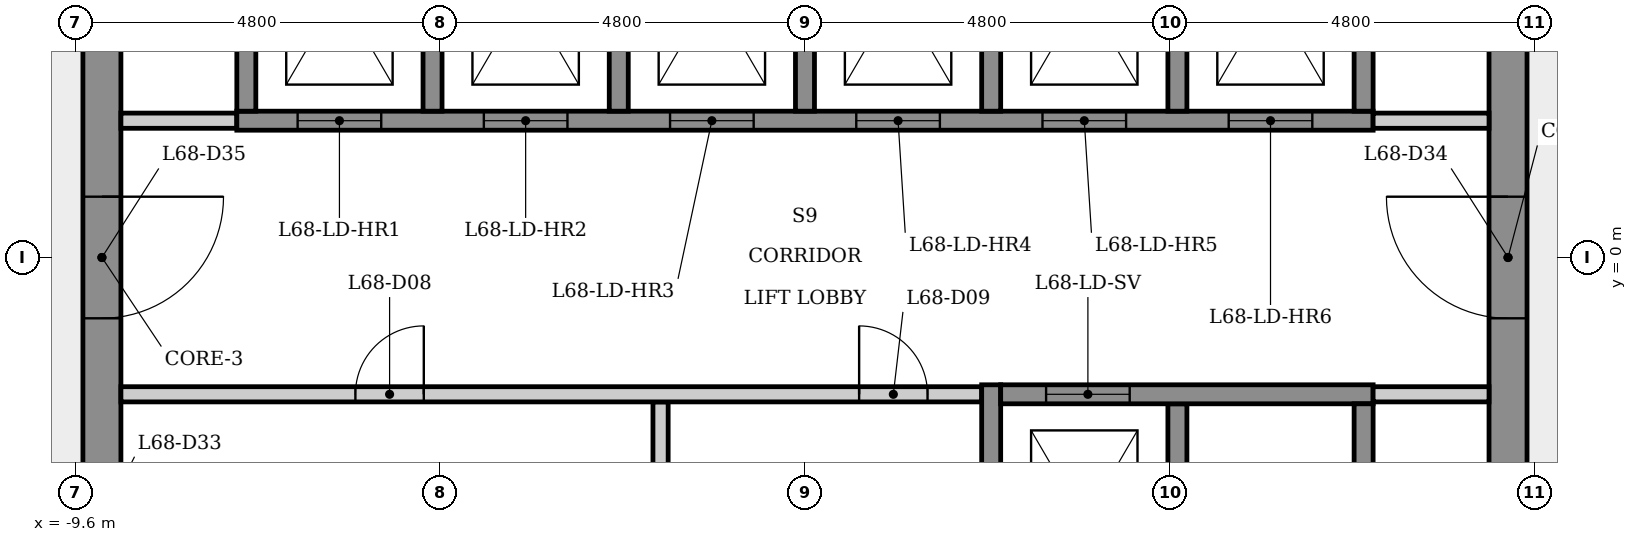
"""IFC4 building model, lengths in metres.
Left out: names, types, materials, properties, quantities, classifications, styles, units other than length and angle.
Written with IfcOpenShell. Run it as: python <this file> out.ifc"""

import sys

from ifc_helpers import new_model, si_unit, direction, frame, frame_2d, origin, place, context, subcontext, project, spatial, rectangle, extrude, element, fill, save


model = new_model("IFC4")
c1 = context("Model", 3, precision=1e-05, world=origin(), true_north=direction((0.0, 1.0)))
c2 = subcontext(c1, "Body", "Model", "MODEL_VIEW")
j1 = project(units=[si_unit("LENGTHUNIT", "METRE"), si_unit("PLANEANGLEUNIT", "RADIAN")], contexts=[c1])
p1 = place(None, origin())
s1 = spatial("IfcSite", under=j1, at=p1, CompositionType="ELEMENT")
p2 = place(p1, origin())
s2 = spatial("IfcBuilding", under=s1, at=p2, CompositionType="ELEMENT")
p3 = place(p2, frame((0.0, 0.0, 252.9)))
s3 = spatial("IfcBuildingStorey", under=s2, at=p3, CompositionType="ELEMENT", Elevation=252.9)
p4 = place(p3, frame((9.25, -5.485, 0.0), z_axis=(0.0, 0.0, 1.0), x_axis=(0.0, 1.0, 0.0)))
e1 = element("IfcWall", 1, at=p4, inside=s3, PredefinedType="SHEAR", context=c2, shape_type="SweptSolid", body=[
    extrude(rectangle(XDim=10.97, YDim=0.5, at=frame_2d((5.485, 0.0))), origin(), (0.0, 0.0, 1.0), 5.0),
])
p5 = place(p4, frame((4.685, 0.0, 0.0)))
e2 = element("IfcOpeningElement", 2, at=p5, cuts=e1, PredefinedType="OPENING", context=c2, shape_type="SweptSolid", body=[
    extrude(rectangle(XDim=1.6, YDim=2.1, at=frame_2d((0.8, 1.05))), frame((0.0, 0.26, 0.0), z_axis=(0.0, -1.0, 0.0), x_axis=(1.0, 0.0, 0.0)), (0.0, 0.0, 1.0), 0.52),
])
p6 = place(p3, frame((-9.25, 5.485, 0.0), z_axis=(0.0, 0.0, 1.0), x_axis=(0.0, -1.0, 0.0)))
e3 = element("IfcWall", 3, at=p6, inside=s3, PredefinedType="SHEAR", context=c2, shape_type="SweptSolid", body=[
    extrude(rectangle(XDim=10.97, YDim=0.5, at=frame_2d((5.485, 0.0))), origin(), (0.0, 0.0, 1.0), 5.0),
])
p7 = place(p6, frame((8.51, 0.0, 0.0)))
e4 = element("IfcOpeningElement", 4, at=p7, cuts=e3, PredefinedType="OPENING", context=c2, shape_type="SweptSolid", body=[
    extrude(rectangle(XDim=0.9, YDim=2.1, at=frame_2d((0.45, 1.05))), frame((0.0, 0.26, 0.0), z_axis=(0.0, -1.0, 0.0), x_axis=(1.0, 0.0, 0.0)), (0.0, 0.0, 1.0), 0.52),
])
p8 = place(p6, frame((4.685, 0.0, 0.0)))
e5 = element("IfcOpeningElement", 5, at=p8, cuts=e3, PredefinedType="OPENING", context=c2, shape_type="SweptSolid", body=[
    extrude(rectangle(XDim=1.6, YDim=2.1, at=frame_2d((0.8, 1.05))), frame((0.0, 0.26, 0.0), z_axis=(0.0, -1.0, 0.0), x_axis=(1.0, 0.0, 0.0)), (0.0, 0.0, 1.0), 0.52),
])
p9 = place(p3, frame((-9.0, 1.8, 0.0), z_axis=(0.0, 0.0, 1.0), x_axis=(1.0, 0.0, 0.0)))
e6 = element("IfcWall", 6, at=p9, inside=s3, PredefinedType="PARTITIONING", context=c2, shape_type="SweptSolid", body=[
    extrude(rectangle(XDim=1.525, YDim=0.2, at=frame_2d((0.763, 0.0))), origin(), (0.0, 0.0, 1.0), 4.6),
])
p10 = place(p3, frame((-7.475, 1.8, 0.0), z_axis=(0.0, 0.0, 1.0), x_axis=(1.0, 0.0, 0.0)))
e7 = element("IfcWall", 7, at=p10, inside=s3, PredefinedType="SHEAR", context=c2, shape_type="SweptSolid", body=[
    extrude(rectangle(XDim=14.95, YDim=0.25, at=frame_2d((7.475, 0.0))), origin(), (0.0, 0.0, 1.0), 4.6),
])
p11 = place(p10, frame((0.8, 0.0, 0.0)))
e8 = element("IfcOpeningElement", 8, at=p11, cuts=e7, PredefinedType="OPENING", context=c2, shape_type="SweptSolid", body=[
    extrude(rectangle(XDim=1.1, YDim=2.1, at=frame_2d((0.55, 1.05))), frame((0.0, 0.135, 0.0), z_axis=(0.0, -1.0, 0.0), x_axis=(1.0, 0.0, 0.0)), (0.0, 0.0, 1.0), 0.27),
])
p12 = place(p10, frame((3.25, 0.0, 0.0)))
e9 = element("IfcOpeningElement", 9, at=p12, cuts=e7, PredefinedType="OPENING", context=c2, shape_type="SweptSolid", body=[
    extrude(rectangle(XDim=1.1, YDim=2.1, at=frame_2d((0.55, 1.05))), frame((0.0, 0.135, 0.0), z_axis=(0.0, -1.0, 0.0), x_axis=(1.0, 0.0, 0.0)), (0.0, 0.0, 1.0), 0.27),
])
p13 = place(p10, frame((5.7, 0.0, 0.0)))
e10 = element("IfcOpeningElement", 10, at=p13, cuts=e7, PredefinedType="OPENING", context=c2, shape_type="SweptSolid", body=[
    extrude(rectangle(XDim=1.1, YDim=2.1, at=frame_2d((0.55, 1.05))), frame((0.0, 0.135, 0.0), z_axis=(0.0, -1.0, 0.0), x_axis=(1.0, 0.0, 0.0)), (0.0, 0.0, 1.0), 0.27),
])
p14 = place(p10, frame((8.15, 0.0, 0.0)))
e11 = element("IfcOpeningElement", 11, at=p14, cuts=e7, PredefinedType="OPENING", context=c2, shape_type="SweptSolid", body=[
    extrude(rectangle(XDim=1.1, YDim=2.1, at=frame_2d((0.55, 1.05))), frame((0.0, 0.135, 0.0), z_axis=(0.0, -1.0, 0.0), x_axis=(1.0, 0.0, 0.0)), (0.0, 0.0, 1.0), 0.27),
])
p15 = place(p10, frame((10.6, 0.0, 0.0)))
e12 = element("IfcOpeningElement", 12, at=p15, cuts=e7, PredefinedType="OPENING", context=c2, shape_type="SweptSolid", body=[
    extrude(rectangle(XDim=1.1, YDim=2.1, at=frame_2d((0.55, 1.05))), frame((0.0, 0.135, 0.0), z_axis=(0.0, -1.0, 0.0), x_axis=(1.0, 0.0, 0.0)), (0.0, 0.0, 1.0), 0.27),
])
p16 = place(p10, frame((13.05, 0.0, 0.0)))
e13 = element("IfcOpeningElement", 13, at=p16, cuts=e7, PredefinedType="OPENING", context=c2, shape_type="SweptSolid", body=[
    extrude(rectangle(XDim=1.1, YDim=2.1, at=frame_2d((0.55, 1.05))), frame((0.0, 0.135, 0.0), z_axis=(0.0, -1.0, 0.0), x_axis=(1.0, 0.0, 0.0)), (0.0, 0.0, 1.0), 0.27),
])
p17 = place(p3, frame((-7.35, 1.925, 0.0), z_axis=(0.0, 0.0, 1.0), x_axis=(0.0, 1.0, 0.0)))
e14 = element("IfcWall", 14, at=p17, inside=s3, PredefinedType="SHEAR", context=c2, shape_type="SweptSolid", body=[
    extrude(rectangle(XDim=3.35, YDim=0.25, at=frame_2d((1.675, 0.0))), origin(), (0.0, 0.0, 1.0), 4.6),
])
for number, where, z_axis, x_axis in (
    (15, (-4.9, 5.025, 0.0), (0.0, 0.0, 1.0), (0.0, -1.0, 0.0)),
    (16, (-2.45, 5.025, 0.0), (0.0, 0.0, 1.0), (0.0, -1.0, 0.0)),
):
    element("IfcWall", number, at=place(p3, frame(where, z_axis=z_axis, x_axis=x_axis)), inside=s3, PredefinedType="SHEAR", context=c2, shape_type="SweptSolid", body=[
        extrude(rectangle(XDim=3.1, YDim=0.25, at=frame_2d((1.55, 0.0))), origin(), (0.0, 0.0, 1.0), 5.0),
    ])
p18 = place(p3, frame((-1.9, -1.9, 0.0), z_axis=(0.0, 0.0, 1.0), x_axis=(0.0, -1.0, 0.0)))
e17 = element("IfcWall", 17, at=p18, inside=s3, PredefinedType="PARTITIONING", context=c2, shape_type="SweptSolid", body=[
    extrude(rectangle(XDim=3.15, YDim=0.2, at=frame_2d((1.575, 0.0))), origin(), (0.0, 0.0, 1.0), 4.6),
])
p19 = place(p3, frame((-9.0, -1.8, 0.0), z_axis=(0.0, 0.0, 1.0), x_axis=(1.0, 0.0, 0.0)))
e18 = element("IfcWall", 18, at=p19, inside=s3, PredefinedType="PARTITIONING", context=c2, shape_type="SweptSolid", body=[
    extrude(rectangle(XDim=11.325, YDim=0.2, at=frame_2d((5.663, 0.0))), origin(), (0.0, 0.0, 1.0), 4.6),
])
p20 = place(p19, frame((3.085, 0.0, 0.0)))
e19 = element("IfcOpeningElement", 19, at=p20, cuts=e18, PredefinedType="OPENING", context=c2, shape_type="SweptSolid", body=[
    extrude(rectangle(XDim=0.9, YDim=2.1, at=frame_2d((0.45, 1.05))), frame((0.0, 0.11, 0.0), z_axis=(0.0, -1.0, 0.0), x_axis=(1.0, 0.0, 0.0)), (0.0, 0.0, 1.0), 0.22),
])
p21 = place(p19, frame((9.713, 0.0, 0.0)))
e20 = element("IfcOpeningElement", 20, at=p21, cuts=e18, PredefinedType="OPENING", context=c2, shape_type="SweptSolid", body=[
    extrude(rectangle(XDim=0.9, YDim=2.1, at=frame_2d((0.45, 1.05))), frame((0.0, 0.11, 0.0), z_axis=(0.0, -1.0, 0.0), x_axis=(1.0, 0.0, 0.0)), (0.0, 0.0, 1.0), 0.22),
])
p22 = place(p3, frame((0.0, 5.025, 0.0), z_axis=(0.0, 0.0, 1.0), x_axis=(0.0, -1.0, 0.0)))
e21 = element("IfcWall", 21, at=p22, inside=s3, PredefinedType="SHEAR", context=c2, shape_type="SweptSolid", body=[
    extrude(rectangle(XDim=3.1, YDim=0.25, at=frame_2d((1.55, 0.0))), origin(), (0.0, 0.0, 1.0), 5.0),
])
p23 = place(p3, frame((2.45, -5.275, 0.0), z_axis=(0.0, 0.0, 1.0), x_axis=(0.0, 1.0, 0.0)))
e22 = element("IfcWall", 22, at=p23, inside=s3, PredefinedType="SHEAR", context=c2, shape_type="SweptSolid", body=[
    extrude(rectangle(XDim=3.6, YDim=0.25, at=frame_2d((1.8, 0.0))), origin(), (0.0, 0.0, 1.0), 4.6),
])
for number, where, z_axis, x_axis in (
    (23, (2.45, 5.025, 0.0), (0.0, 0.0, 1.0), (0.0, -1.0, 0.0)),
    (24, (4.9, -1.925, 0.0), (0.0, 0.0, 1.0), (0.0, -1.0, 0.0)),
    (25, (4.9, 5.025, 0.0), (0.0, 0.0, 1.0), (0.0, -1.0, 0.0)),
):
    element("IfcWall", number, at=place(p3, frame(where, z_axis=z_axis, x_axis=x_axis)), inside=s3, PredefinedType="SHEAR", context=c2, shape_type="SweptSolid", body=[
        extrude(rectangle(XDim=3.1, YDim=0.25, at=frame_2d((1.55, 0.0))), origin(), (0.0, 0.0, 1.0), 5.0),
    ])
p24 = place(p3, frame((2.575, -1.8, 0.0), z_axis=(0.0, 0.0, 1.0), x_axis=(1.0, 0.0, 0.0)))
e26 = element("IfcWall", 26, at=p24, inside=s3, PredefinedType="SHEAR", context=c2, shape_type="SweptSolid", body=[
    extrude(rectangle(XDim=4.9, YDim=0.25, at=frame_2d((2.45, 0.0))), origin(), (0.0, 0.0, 1.0), 4.6),
])
p25 = place(p24, frame((0.597, 0.0, 0.0)))
e27 = element("IfcOpeningElement", 27, at=p25, cuts=e26, PredefinedType="OPENING", context=c2, shape_type="SweptSolid", body=[
    extrude(rectangle(XDim=1.1, YDim=2.1, at=frame_2d((0.55, 1.05))), frame((0.0, 0.135, 0.0), z_axis=(0.0, -1.0, 0.0), x_axis=(1.0, 0.0, 0.0)), (0.0, 0.0, 1.0), 0.27),
])
p26 = place(p3, frame((7.475, 1.8, 0.0), z_axis=(0.0, 0.0, 1.0), x_axis=(1.0, 0.0, 0.0)))
e28 = element("IfcWall", 28, at=p26, inside=s3, PredefinedType="PARTITIONING", context=c2, shape_type="SweptSolid", body=[
    extrude(rectangle(XDim=1.525, YDim=0.2, at=frame_2d((0.763, 0.0))), origin(), (0.0, 0.0, 1.0), 4.6),
])
for number, where, z_axis, x_axis in (
    (29, (7.35, -1.925, 0.0), (0.0, 0.0, 1.0), (0.0, -1.0, 0.0)),
    (30, (7.35, 5.025, 0.0), (0.0, 0.0, 1.0), (0.0, -1.0, 0.0)),
):
    element("IfcWall", number, at=place(p3, frame(where, z_axis=z_axis, x_axis=x_axis)), inside=s3, PredefinedType="SHEAR", context=c2, shape_type="SweptSolid", body=[
        extrude(rectangle(XDim=3.1, YDim=0.25, at=frame_2d((1.55, 0.0))), origin(), (0.0, 0.0, 1.0), 5.0),
    ])
p27 = place(p3, frame((9.0, -1.8, 0.0), z_axis=(0.0, 0.0, 1.0), x_axis=(-1.0, 0.0, 0.0)))
e31 = element("IfcWall", 31, at=p27, inside=s3, PredefinedType="PARTITIONING", context=c2, shape_type="SweptSolid", body=[
    extrude(rectangle(XDim=1.525, YDim=0.2, at=frame_2d((0.763, 0.0))), origin(), (0.0, 0.0, 1.0), 4.6),
])
p28 = place(p11, origin())
e32 = element("IfcDoor", 32, at=p28, inside=s3, OperationType="SLIDING_TO_LEFT", PredefinedType="DOOR", context=c2, shape_type="SweptSolid", body=[
    extrude(rectangle(XDim=1.1, YDim=2.1, at=frame_2d((0.55, 1.05))), frame((0.0, 0.025, 0.0), z_axis=(0.0, -1.0, 0.0), x_axis=(1.0, 0.0, 0.0)), (0.0, 0.0, 1.0), 0.05),
])
fill(e8, e32)
p29 = place(p12, origin())
e33 = element("IfcDoor", 33, at=p29, inside=s3, OperationType="SLIDING_TO_LEFT", PredefinedType="DOOR", context=c2, shape_type="SweptSolid", body=[
    extrude(rectangle(XDim=1.1, YDim=2.1, at=frame_2d((0.55, 1.05))), frame((0.0, 0.025, 0.0), z_axis=(0.0, -1.0, 0.0), x_axis=(1.0, 0.0, 0.0)), (0.0, 0.0, 1.0), 0.05),
])
fill(e9, e33)
p30 = place(p13, origin())
e34 = element("IfcDoor", 34, at=p30, inside=s3, OperationType="SLIDING_TO_LEFT", PredefinedType="DOOR", context=c2, shape_type="SweptSolid", body=[
    extrude(rectangle(XDim=1.1, YDim=2.1, at=frame_2d((0.55, 1.05))), frame((0.0, 0.025, 0.0), z_axis=(0.0, -1.0, 0.0), x_axis=(1.0, 0.0, 0.0)), (0.0, 0.0, 1.0), 0.05),
])
fill(e10, e34)
p31 = place(p14, origin())
e35 = element("IfcDoor", 35, at=p31, inside=s3, OperationType="SLIDING_TO_LEFT", PredefinedType="DOOR", context=c2, shape_type="SweptSolid", body=[
    extrude(rectangle(XDim=1.1, YDim=2.1, at=frame_2d((0.55, 1.05))), frame((0.0, 0.025, 0.0), z_axis=(0.0, -1.0, 0.0), x_axis=(1.0, 0.0, 0.0)), (0.0, 0.0, 1.0), 0.05),
])
fill(e11, e35)
p32 = place(p15, origin())
e36 = element("IfcDoor", 36, at=p32, inside=s3, OperationType="SLIDING_TO_LEFT", PredefinedType="DOOR", context=c2, shape_type="SweptSolid", body=[
    extrude(rectangle(XDim=1.1, YDim=2.1, at=frame_2d((0.55, 1.05))), frame((0.0, 0.025, 0.0), z_axis=(0.0, -1.0, 0.0), x_axis=(1.0, 0.0, 0.0)), (0.0, 0.0, 1.0), 0.05),
])
fill(e12, e36)
p33 = place(p16, origin())
e37 = element("IfcDoor", 37, at=p33, inside=s3, OperationType="SLIDING_TO_LEFT", PredefinedType="DOOR", context=c2, shape_type="SweptSolid", body=[
    extrude(rectangle(XDim=1.1, YDim=2.1, at=frame_2d((0.55, 1.05))), frame((0.0, 0.025, 0.0), z_axis=(0.0, -1.0, 0.0), x_axis=(1.0, 0.0, 0.0)), (0.0, 0.0, 1.0), 0.05),
])
fill(e13, e37)
p34 = place(p25, origin())
e38 = element("IfcDoor", 38, at=p34, inside=s3, OperationType="SLIDING_TO_LEFT", PredefinedType="DOOR", context=c2, shape_type="SweptSolid", body=[
    extrude(rectangle(XDim=1.1, YDim=2.1, at=frame_2d((0.55, 1.05))), frame((0.0, 0.025, 0.0), z_axis=(0.0, -1.0, 0.0), x_axis=(1.0, 0.0, 0.0)), (0.0, 0.0, 1.0), 0.05),
])
fill(e27, e38)
p35 = place(p20, origin())
e39 = element("IfcDoor", 39, at=p35, inside=s3, OperationType="SINGLE_SWING_RIGHT", PredefinedType="DOOR", context=c2, shape_type="SweptSolid", body=[
    extrude(rectangle(XDim=0.9, YDim=2.1, at=frame_2d((0.45, 1.05))), frame((0.0, 0.025, 0.0), z_axis=(0.0, -1.0, 0.0), x_axis=(1.0, 0.0, 0.0)), (0.0, 0.0, 1.0), 0.05),
])
fill(e19, e39)
p36 = place(p21, origin())
e40 = element("IfcDoor", 40, at=p36, inside=s3, OperationType="SINGLE_SWING_LEFT", PredefinedType="DOOR", context=c2, shape_type="SweptSolid", body=[
    extrude(rectangle(XDim=0.9, YDim=2.1, at=frame_2d((0.45, 1.05))), frame((0.0, 0.025, 0.0), z_axis=(0.0, -1.0, 0.0), x_axis=(1.0, 0.0, 0.0)), (0.0, 0.0, 1.0), 0.05),
])
fill(e20, e40)
p37 = place(p5, origin())
e41 = element("IfcDoor", 41, at=p37, inside=s3, OperationType="SINGLE_SWING_RIGHT", PredefinedType="DOOR", context=c2, shape_type="SweptSolid", body=[
    extrude(rectangle(XDim=1.6, YDim=2.1, at=frame_2d((0.8, 1.05))), frame((0.0, 0.025, 0.0), z_axis=(0.0, -1.0, 0.0), x_axis=(1.0, 0.0, 0.0)), (0.0, 0.0, 1.0), 0.05),
])
fill(e2, e41)
p38 = place(p8, origin())
e42 = element("IfcDoor", 42, at=p38, inside=s3, OperationType="SINGLE_SWING_LEFT", PredefinedType="DOOR", context=c2, shape_type="SweptSolid", body=[
    extrude(rectangle(XDim=1.6, YDim=2.1, at=frame_2d((0.8, 1.05))), frame((0.0, 0.025, 0.0), z_axis=(0.0, -1.0, 0.0), x_axis=(1.0, 0.0, 0.0)), (0.0, 0.0, 1.0), 0.05),
])
fill(e5, e42)
save(model, sys.argv[1])
